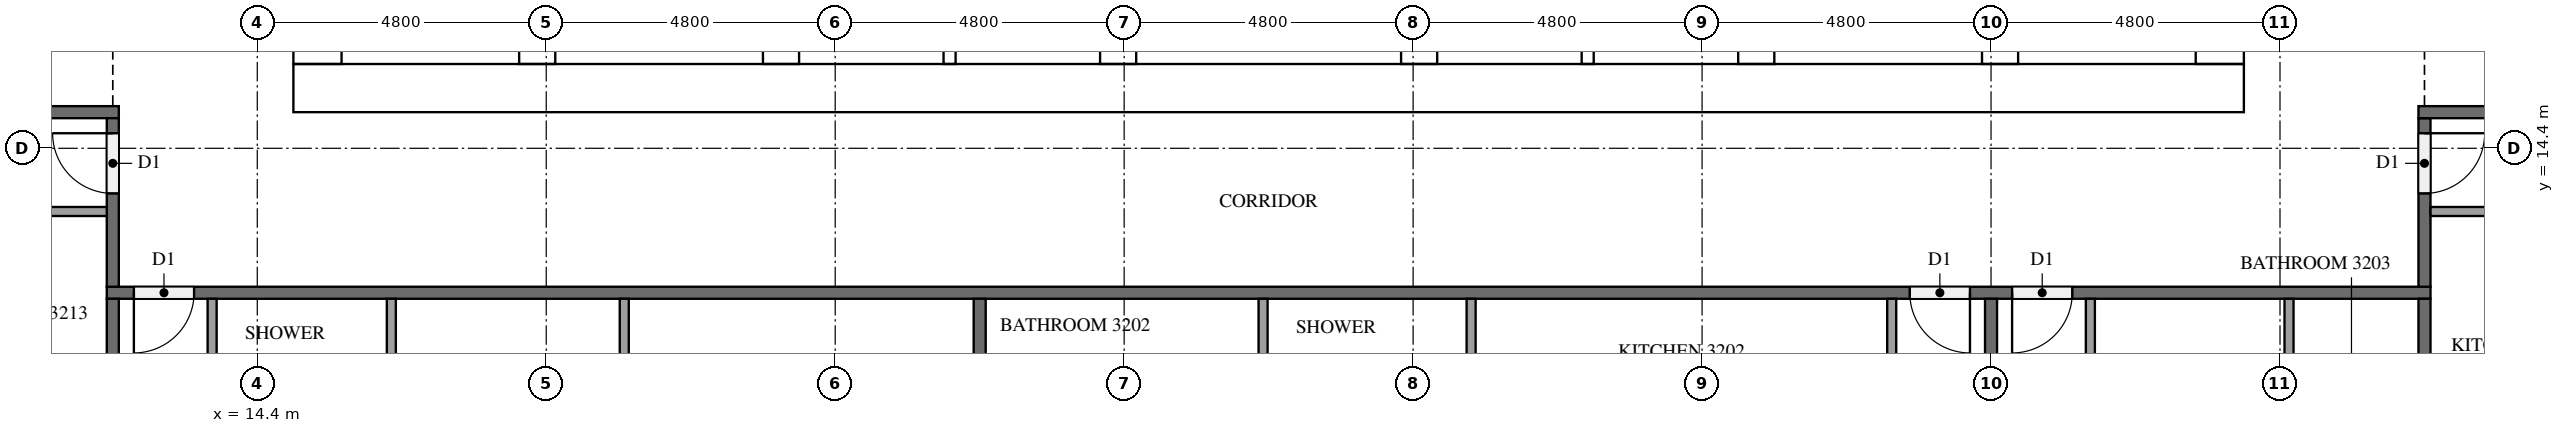
"""IFC4 building model, lengths in metres.
Left out: names, types, materials, properties, quantities, classifications, styles, units other than length and angle.
Written with IfcOpenShell. Run it as: python <this file> out.ifc"""

import sys

from ifc_helpers import new_model, si_unit, direction, frame, frame_2d, origin, place, context, subcontext, project, spatial, rectangle, extrude, element, fill, save


model = new_model("IFC4")
c1 = context("Model", 3, precision=1e-05, world=origin(), true_north=direction((0.0, 1.0)))
c2 = subcontext(c1, "Body", "Model", "MODEL_VIEW")
j1 = project(units=[si_unit("LENGTHUNIT", "METRE"), si_unit("PLANEANGLEUNIT", "RADIAN")], contexts=[c1])
p1 = place(None, origin())
s1 = spatial("IfcSite", under=j1, at=p1, CompositionType="ELEMENT")
p2 = place(p1, origin())
s2 = spatial("IfcBuilding", under=s1, at=p2, CompositionType="ELEMENT")
p3 = place(p2, frame((0.0, 0.0, 126.1)))
s3 = spatial("IfcBuildingStorey", under=s2, at=p3, CompositionType="ELEMENT", Elevation=126.1)
p4 = place(p3, frame((15.0, 15.4, 0.0), z_axis=(0.0, 0.0, 1.0), x_axis=(1.0, 0.0, 0.0)))
e1 = element("IfcWall", 1, at=p4, inside=s3, PredefinedType="SHEAR", context=c2, shape_type="SweptSolid", body=[
    extrude(rectangle(XDim=32.4, YDim=0.8, at=frame_2d((16.2, 0.0))), origin(), (0.0, 0.0, 1.0), 3.2),
])
p5 = place(p4, frame((15.3, 0.0, 0.0)))
e2 = element("IfcOpeningElement", 2, at=p5, cuts=e1, PredefinedType="OPENING", context=c2, shape_type="SweptSolid", body=[
    extrude(rectangle(XDim=1.8, YDim=2.1, at=frame_2d((0.9, 1.05))), frame((0.0, 0.41, 0.0), z_axis=(0.0, -1.0, 0.0), x_axis=(1.0, 0.0, 0.0)), (0.0, 0.0, 1.0), 0.82),
])
p6 = place(p3, frame((15.4, 15.8, 0.0), z_axis=(0.0, 0.0, 1.0), x_axis=(0.0, 1.0, 0.0)))
e3 = element("IfcWall", 3, at=p6, inside=s3, PredefinedType="SHEAR", context=c2, shape_type="SweptSolid", body=[
    extrude(rectangle(XDim=21.2, YDim=0.8, at=frame_2d((10.6, 0.0))), origin(), (0.0, 0.0, 1.0), 3.2),
])
p7 = place(p6, frame((4.96, 0.0, 0.0)))
e4 = element("IfcOpeningElement", 4, at=p7, cuts=e3, PredefinedType="OPENING", context=c2, shape_type="SweptSolid", body=[
    extrude(rectangle(XDim=1.2, YDim=2.1, at=frame_2d((0.6, 1.05))), frame((0.0, 0.41, 0.0), z_axis=(0.0, -1.0, 0.0), x_axis=(1.0, 0.0, 0.0)), (0.0, 0.0, 1.0), 0.82),
])
p8 = place(p3, frame((47.0, 15.8, 0.0), z_axis=(0.0, 0.0, 1.0), x_axis=(0.0, 1.0, 0.0)))
e5 = element("IfcWall", 5, at=p8, inside=s3, PredefinedType="SHEAR", context=c2, shape_type="SweptSolid", body=[
    extrude(rectangle(XDim=21.2, YDim=0.8, at=frame_2d((10.6, 0.0))), origin(), (0.0, 0.0, 1.0), 3.2),
])
p9 = place(p8, frame((10.3, 0.0, 0.0)))
e6 = element("IfcOpeningElement", 6, at=p9, cuts=e5, PredefinedType="OPENING", context=c2, shape_type="SweptSolid", body=[
    extrude(rectangle(XDim=1.2, YDim=2.1, at=frame_2d((0.6, 1.05))), frame((0.0, 0.41, 0.0), z_axis=(0.0, -1.0, 0.0), x_axis=(1.0, 0.0, 0.0)), (0.0, 0.0, 1.0), 0.82),
])
p10 = place(p3, frame((19.05, 15.8, 0.0), z_axis=(0.0, 0.0, 1.0), x_axis=(0.0, 1.0, 0.0)))
e7 = element("IfcWall", 7, at=p10, inside=s3, PredefinedType="SHEAR", context=c2, shape_type="SweptSolid", body=[
    extrude(rectangle(XDim=15.15, YDim=0.6, at=frame_2d((7.575, 0.0))), origin(), (0.0, 0.0, 1.0), 3.2),
])
p11 = place(p10, frame((9.65, 0.0, 0.0)))
e8 = element("IfcOpeningElement", 8, at=p11, cuts=e7, PredefinedType="OPENING", context=c2, shape_type="SweptSolid", body=[
    extrude(rectangle(XDim=1.1, YDim=2.1, at=frame_2d((0.55, 1.05))), frame((0.0, 0.31, 0.0), z_axis=(0.0, -1.0, 0.0), x_axis=(1.0, 0.0, 0.0)), (0.0, 0.0, 1.0), 0.62),
])
p12 = place(p10, frame((13.15, 0.0, 0.0)))
e9 = element("IfcOpeningElement", 9, at=p12, cuts=e7, PredefinedType="OPENING", context=c2, shape_type="SweptSolid", body=[
    extrude(rectangle(XDim=1.1, YDim=2.1, at=frame_2d((0.55, 1.05))), frame((0.0, 0.31, 0.0), z_axis=(0.0, -1.0, 0.0), x_axis=(1.0, 0.0, 0.0)), (0.0, 0.0, 1.0), 0.62),
])
p13 = place(p10, frame((0.4, 0.0, 0.0)))
e10 = element("IfcOpeningElement", 10, at=p13, cuts=e7, PredefinedType="OPENING", context=c2, shape_type="SweptSolid", body=[
    extrude(rectangle(XDim=1.2, YDim=2.1, at=frame_2d((0.6, 1.05))), frame((0.0, 0.31, 0.0), z_axis=(0.0, -1.0, 0.0), x_axis=(1.0, 0.0, 0.0)), (0.0, 0.0, 1.0), 0.62),
])
p14 = place(p3, frame((23.1, 15.8, 0.0), z_axis=(0.0, 0.0, 1.0), x_axis=(0.0, 1.0, 0.0)))
e11 = element("IfcWall", 11, at=p14, inside=s3, PredefinedType="SHEAR", context=c2, shape_type="SweptSolid", body=[
    extrude(rectangle(XDim=21.2, YDim=0.6, at=frame_2d((10.6, 0.0))), origin(), (0.0, 0.0, 1.0), 3.2),
])
p15 = place(p3, frame((39.3, 15.8, 0.0), z_axis=(0.0, 0.0, 1.0), x_axis=(0.0, 1.0, 0.0)))
e12 = element("IfcWall", 12, at=p15, inside=s3, PredefinedType="SHEAR", context=c2, shape_type="SweptSolid", body=[
    extrude(rectangle(XDim=8.45, YDim=0.6, at=frame_2d((4.225, 0.0))), origin(), (0.0, 0.0, 1.0), 3.2),
])
p16 = place(p3, frame((43.35, 15.8, 0.0), z_axis=(0.0, 0.0, 1.0), x_axis=(0.0, 1.0, 0.0)))
e13 = element("IfcWall", 13, at=p16, inside=s3, PredefinedType="SHEAR", context=c2, shape_type="SweptSolid", body=[
    extrude(rectangle(XDim=8.45, YDim=0.6, at=frame_2d((4.225, 0.0))), origin(), (0.0, 0.0, 1.0), 3.2),
])
p17 = place(p16, frame((0.4, 0.0, 0.0)))
e14 = element("IfcOpeningElement", 14, at=p17, cuts=e13, PredefinedType="OPENING", context=c2, shape_type="SweptSolid", body=[
    extrude(rectangle(XDim=1.2, YDim=2.1, at=frame_2d((0.6, 1.05))), frame((0.0, 0.31, 0.0), z_axis=(0.0, -1.0, 0.0), x_axis=(1.0, 0.0, 0.0)), (0.0, 0.0, 1.0), 0.62),
])
for number, where, z_axis, x_axis in (
    (15, (28.7, 15.8, 0.0), (0.0, 0.0, 1.0), (0.0, 1.0, 0.0)),
    (16, (33.7, 15.8, 0.0), (0.0, 0.0, 1.0), (0.0, 1.0, 0.0)),
):
    element("IfcWall", number, at=place(p3, frame(where, z_axis=z_axis, x_axis=x_axis)), inside=s3, PredefinedType="SHEAR", context=c2, shape_type="SweptSolid", body=[
        extrude(rectangle(XDim=2.65, YDim=0.6, at=frame_2d((1.325, 0.0))), origin(), (0.0, 0.0, 1.0), 3.2),
    ])
for number, where, z_axis, x_axis in (
    (17, (25.9, 15.8, 0.0), (0.0, 0.0, 1.0), (0.0, 1.0, 0.0)),
    (18, (36.5, 15.8, 0.0), (0.0, 0.0, 1.0), (0.0, 1.0, 0.0)),
):
    element("IfcWall", number, at=place(p3, frame(where, z_axis=z_axis, x_axis=x_axis)), inside=s3, PredefinedType="SOLIDWALL", context=c2, shape_type="SweptSolid", body=[
        extrude(rectangle(XDim=2.65, YDim=0.2, at=frame_2d((1.325, 0.0))), origin(), (0.0, 0.0, 1.0), 3.2),
    ])
p18 = place(p3, frame((50.5, 12.0, 0.0), z_axis=(0.0, 0.0, 1.0), x_axis=(-1.0, 0.0, 0.0)))
e19 = element("IfcWall", 19, at=p18, inside=s3, PredefinedType="PARTITIONING", context=c2, shape_type="SweptSolid", body=[
    extrude(rectangle(XDim=38.6, YDim=0.2, at=frame_2d((19.3, 0.0))), origin(), (0.0, 0.0, 1.0), 3.2),
])
p19 = place(p18, frame((37.15, 0.0, 0.0)))
e20 = element("IfcOpeningElement", 20, at=p19, cuts=e19, PredefinedType="OPENING", context=c2, shape_type="SweptSolid", body=[
    extrude(rectangle(XDim=1.0, YDim=2.1, at=frame_2d((0.5, 1.05))), frame((0.0, 0.11, 0.0), z_axis=(0.0, -1.0, 0.0), x_axis=(1.0, 0.0, 0.0)), (0.0, 0.0, 1.0), 0.22),
])
p20 = place(p18, frame((7.65, 0.0, 0.0)))
e21 = element("IfcOpeningElement", 21, at=p20, cuts=e19, PredefinedType="OPENING", context=c2, shape_type="SweptSolid", body=[
    extrude(rectangle(XDim=1.0, YDim=2.1, at=frame_2d((0.5, 1.05))), frame((0.0, 0.11, 0.0), z_axis=(0.0, -1.0, 0.0), x_axis=(1.0, 0.0, 0.0)), (0.0, 0.0, 1.0), 0.22),
])
p21 = place(p18, frame((5.95, 0.0, 0.0)))
e22 = element("IfcOpeningElement", 22, at=p21, cuts=e19, PredefinedType="OPENING", context=c2, shape_type="SweptSolid", body=[
    extrude(rectangle(XDim=1.0, YDim=2.1, at=frame_2d((0.5, 1.05))), frame((0.0, 0.11, 0.0), z_axis=(0.0, -1.0, 0.0), x_axis=(1.0, 0.0, 0.0)), (0.0, 0.0, 1.0), 0.22),
])
p22 = place(p3, frame((50.4, 14.9, 0.0), z_axis=(0.0, 0.0, 1.0), x_axis=(0.0, -1.0, 0.0)))
e23 = element("IfcWall", 23, at=p22, inside=s3, PredefinedType="PARTITIONING", context=c2, shape_type="SweptSolid", body=[
    extrude(rectangle(XDim=2.8, YDim=0.2, at=frame_2d((1.4, 0.0))), origin(), (0.0, 0.0, 1.0), 3.2),
])
p23 = place(p22, frame((0.25, 0.0, 0.0)))
e24 = element("IfcOpeningElement", 24, at=p23, cuts=e23, PredefinedType="OPENING", context=c2, shape_type="SweptSolid", body=[
    extrude(rectangle(XDim=1.0, YDim=2.1, at=frame_2d((0.5, 1.05))), frame((0.0, 0.11, 0.0), z_axis=(0.0, -1.0, 0.0), x_axis=(1.0, 0.0, 0.0)), (0.0, 0.0, 1.0), 0.22),
])
p24 = place(p3, frame((50.3, 15.0, 0.0), z_axis=(0.0, 0.0, 1.0), x_axis=(1.0, 0.0, 0.0)))
e25 = element("IfcWall", 25, at=p24, inside=s3, PredefinedType="PARTITIONING", context=c2, shape_type="SweptSolid", body=[
    extrude(rectangle(XDim=2.2, YDim=0.2, at=frame_2d((1.1, 0.0))), origin(), (0.0, 0.0, 1.0), 3.2),
])
p25 = place(p3, frame((9.9, 15.0, 0.0), z_axis=(0.0, 0.0, 1.0), x_axis=(1.0, 0.0, 0.0)))
e26 = element("IfcWall", 26, at=p25, inside=s3, PredefinedType="PARTITIONING", context=c2, shape_type="SweptSolid", body=[
    extrude(rectangle(XDim=2.2, YDim=0.2, at=frame_2d((1.1, 0.0))), origin(), (0.0, 0.0, 1.0), 3.2),
])
p26 = place(p3, frame((12.0, 12.1, 0.0), z_axis=(0.0, 0.0, 1.0), x_axis=(0.0, 1.0, 0.0)))
e27 = element("IfcWall", 27, at=p26, inside=s3, PredefinedType="PARTITIONING", context=c2, shape_type="SweptSolid", body=[
    extrude(rectangle(XDim=2.8, YDim=0.2, at=frame_2d((1.4, 0.0))), origin(), (0.0, 0.0, 1.0), 3.2),
])
p27 = place(p26, frame((1.55, 0.0, 0.0)))
e28 = element("IfcOpeningElement", 28, at=p27, cuts=e27, PredefinedType="OPENING", context=c2, shape_type="SweptSolid", body=[
    extrude(rectangle(XDim=1.0, YDim=2.1, at=frame_2d((0.5, 1.05))), frame((0.0, 0.11, 0.0), z_axis=(0.0, -1.0, 0.0), x_axis=(1.0, 0.0, 0.0)), (0.0, 0.0, 1.0), 0.22),
])
for number, where, z_axis, x_axis in (
    (29, (26.4, 11.9, 0.0), (0.0, 0.0, 1.0), (0.0, -1.0, 0.0)),
    (30, (12.0, 4.9, 0.0), (0.0, 0.0, 1.0), (0.0, 1.0, 0.0)),
):
    element("IfcWall", number, at=place(p3, frame(where, z_axis=z_axis, x_axis=x_axis)), inside=s3, PredefinedType="PARTITIONING", context=c2, shape_type="SweptSolid", body=[
        extrude(rectangle(XDim=7.0, YDim=0.2, at=frame_2d((3.5, 0.0))), origin(), (0.0, 0.0, 1.0), 3.2),
    ])
p28 = place(p3, frame((43.2, 11.9, 0.0), z_axis=(0.0, 0.0, 1.0), x_axis=(0.0, -1.0, 0.0)))
e31 = element("IfcWall", 31, at=p28, inside=s3, PredefinedType="PARTITIONING", context=c2, shape_type="SweptSolid", body=[
    extrude(rectangle(XDim=6.725, YDim=0.2, at=frame_2d((3.362, 0.0))), origin(), (0.0, 0.0, 1.0), 3.2),
])
p29 = place(p3, frame((50.4, 11.9, 0.0), z_axis=(0.0, 0.0, 1.0), x_axis=(0.0, -1.0, 0.0)))
e32 = element("IfcWall", 32, at=p29, inside=s3, PredefinedType="PARTITIONING", context=c2, shape_type="SweptSolid", body=[
    extrude(rectangle(XDim=7.0, YDim=0.2, at=frame_2d((3.5, 0.0))), origin(), (0.0, 0.0, 1.0), 3.2),
])
for number, where, z_axis, x_axis in (
    (33, (16.627, 11.9, 0.0), (0.0, 0.0, 1.0), (0.0, -1.0, 0.0)),
    (34, (20.496, 11.9, 0.0), (0.0, 0.0, 1.0), (0.0, -1.0, 0.0)),
):
    element("IfcWall", number, at=place(p3, frame(where, z_axis=z_axis, x_axis=x_axis)), inside=s3, PredefinedType="PARTITIONING", context=c2, shape_type="SweptSolid", body=[
        extrude(rectangle(XDim=2.225, YDim=0.15, at=frame_2d((1.112, 0.0))), origin(), (0.0, 0.0, 1.0), 3.2),
    ])
p30 = place(p3, frame((13.65, 11.9, 0.0), z_axis=(0.0, 0.0, 1.0), x_axis=(0.0, -1.0, 0.0)))
e35 = element("IfcWall", 35, at=p30, inside=s3, PredefinedType="PARTITIONING", context=c2, shape_type="SweptSolid", body=[
    extrude(rectangle(XDim=2.375, YDim=0.15, at=frame_2d((1.188, 0.0))), origin(), (0.0, 0.0, 1.0), 3.2),
])
for number, where, z_axis, x_axis in (
    (36, (34.563, 11.9, 0.0), (0.0, 0.0, 1.0), (0.0, -1.0, 0.0)),
    (37, (31.108, 11.9, 0.0), (0.0, 0.0, 1.0), (0.0, -1.0, 0.0)),
):
    element("IfcWall", number, at=place(p3, frame(where, z_axis=z_axis, x_axis=x_axis)), inside=s3, PredefinedType="PARTITIONING", context=c2, shape_type="SweptSolid", body=[
        extrude(rectangle(XDim=1.775, YDim=0.15, at=frame_2d((0.887, 0.0))), origin(), (0.0, 0.0, 1.0), 3.2),
    ])
p31 = place(p3, frame((41.55, 11.9, 0.0), z_axis=(0.0, 0.0, 1.0), x_axis=(0.0, -1.0, 0.0)))
e38 = element("IfcWall", 38, at=p31, inside=s3, PredefinedType="PARTITIONING", context=c2, shape_type="SweptSolid", body=[
    extrude(rectangle(XDim=1.925, YDim=0.15, at=frame_2d((0.962, 0.0))), origin(), (0.0, 0.0, 1.0), 3.2),
])
p32 = place(p3, frame((48.15, 11.9, 0.0), z_axis=(0.0, 0.0, 1.0), x_axis=(0.0, -1.0, 0.0)))
e39 = element("IfcWall", 39, at=p32, inside=s3, PredefinedType="PARTITIONING", context=c2, shape_type="SweptSolid", body=[
    extrude(rectangle(XDim=2.375, YDim=0.15, at=frame_2d((1.188, 0.0))), origin(), (0.0, 0.0, 1.0), 3.2),
])
p33 = place(p3, frame((44.85, 11.9, 0.0), z_axis=(0.0, 0.0, 1.0), x_axis=(0.0, -1.0, 0.0)))
e40 = element("IfcWall", 40, at=p33, inside=s3, PredefinedType="PARTITIONING", context=c2, shape_type="SweptSolid", body=[
    extrude(rectangle(XDim=2.525, YDim=0.15, at=frame_2d((1.262, 0.0))), origin(), (0.0, 0.0, 1.0), 3.2),
])
p34 = place(p3, frame((50.5, 13.35, 0.0), z_axis=(0.0, 0.0, 1.0), x_axis=(1.0, 0.0, 0.0)))
e41 = element("IfcWall", 41, at=p34, inside=s3, PredefinedType="PARTITIONING", context=c2, shape_type="SweptSolid", body=[
    extrude(rectangle(XDim=2.225, YDim=0.15, at=frame_2d((1.113, 0.0))), origin(), (0.0, 0.0, 1.0), 3.2),
])
p35 = place(p3, frame((11.9, 13.35, 0.0), z_axis=(0.0, 0.0, 1.0), x_axis=(-1.0, 0.0, 0.0)))
e42 = element("IfcWall", 42, at=p35, inside=s3, PredefinedType="PARTITIONING", context=c2, shape_type="SweptSolid", body=[
    extrude(rectangle(XDim=3.275, YDim=0.15, at=frame_2d((1.637, 0.0))), origin(), (0.0, 0.0, 1.0), 3.2),
])
p36 = place(p5, frame((1.8, 0.0, 0.0), z_axis=(0.0, 0.0, 1.0), x_axis=(-1.0, 0.0, 0.0)))
e43 = element("IfcDoor", 43, at=p36, inside=s3, OperationType="DOUBLE_DOOR_SINGLE_SWING", PredefinedType="DOOR", context=c2, shape_type="SweptSolid", body=[
    extrude(rectangle(XDim=1.8, YDim=2.1, at=frame_2d((0.9, 1.05))), frame((0.0, 0.025, 0.0), z_axis=(0.0, -1.0, 0.0), x_axis=(1.0, 0.0, 0.0)), (0.0, 0.0, 1.0), 0.05),
])
fill(e2, e43)
p37 = place(p19, origin())
e44 = element("IfcDoor", 44, at=p37, inside=s3, OperationType="SINGLE_SWING_RIGHT", PredefinedType="DOOR", context=c2, shape_type="SweptSolid", body=[
    extrude(rectangle(XDim=1.0, YDim=2.1, at=frame_2d((0.5, 1.05))), frame((0.0, 0.025, 0.0), z_axis=(0.0, -1.0, 0.0), x_axis=(1.0, 0.0, 0.0)), (0.0, 0.0, 1.0), 0.05),
])
fill(e20, e44)
p38 = place(p20, origin())
e45 = element("IfcDoor", 45, at=p38, inside=s3, OperationType="SINGLE_SWING_LEFT", PredefinedType="DOOR", context=c2, shape_type="SweptSolid", body=[
    extrude(rectangle(XDim=1.0, YDim=2.1, at=frame_2d((0.5, 1.05))), frame((0.0, 0.025, 0.0), z_axis=(0.0, -1.0, 0.0), x_axis=(1.0, 0.0, 0.0)), (0.0, 0.0, 1.0), 0.05),
])
fill(e21, e45)
p39 = place(p21, origin())
e46 = element("IfcDoor", 46, at=p39, inside=s3, OperationType="SINGLE_SWING_RIGHT", PredefinedType="DOOR", context=c2, shape_type="SweptSolid", body=[
    extrude(rectangle(XDim=1.0, YDim=2.1, at=frame_2d((0.5, 1.05))), frame((0.0, 0.025, 0.0), z_axis=(0.0, -1.0, 0.0), x_axis=(1.0, 0.0, 0.0)), (0.0, 0.0, 1.0), 0.05),
])
fill(e22, e46)
p40 = place(p23, origin())
e47 = element("IfcDoor", 47, at=p40, inside=s3, OperationType="SINGLE_SWING_LEFT", PredefinedType="DOOR", context=c2, shape_type="SweptSolid", body=[
    extrude(rectangle(XDim=1.0, YDim=2.1, at=frame_2d((0.5, 1.05))), frame((0.0, 0.025, 0.0), z_axis=(0.0, -1.0, 0.0), x_axis=(1.0, 0.0, 0.0)), (0.0, 0.0, 1.0), 0.05),
])
fill(e24, e47)
p41 = place(p27, origin())
e48 = element("IfcDoor", 48, at=p41, inside=s3, OperationType="SINGLE_SWING_RIGHT", PredefinedType="DOOR", context=c2, shape_type="SweptSolid", body=[
    extrude(rectangle(XDim=1.0, YDim=2.1, at=frame_2d((0.5, 1.05))), frame((0.0, 0.025, 0.0), z_axis=(0.0, -1.0, 0.0), x_axis=(1.0, 0.0, 0.0)), (0.0, 0.0, 1.0), 0.05),
])
fill(e28, e48)
save(model, sys.argv[1])
